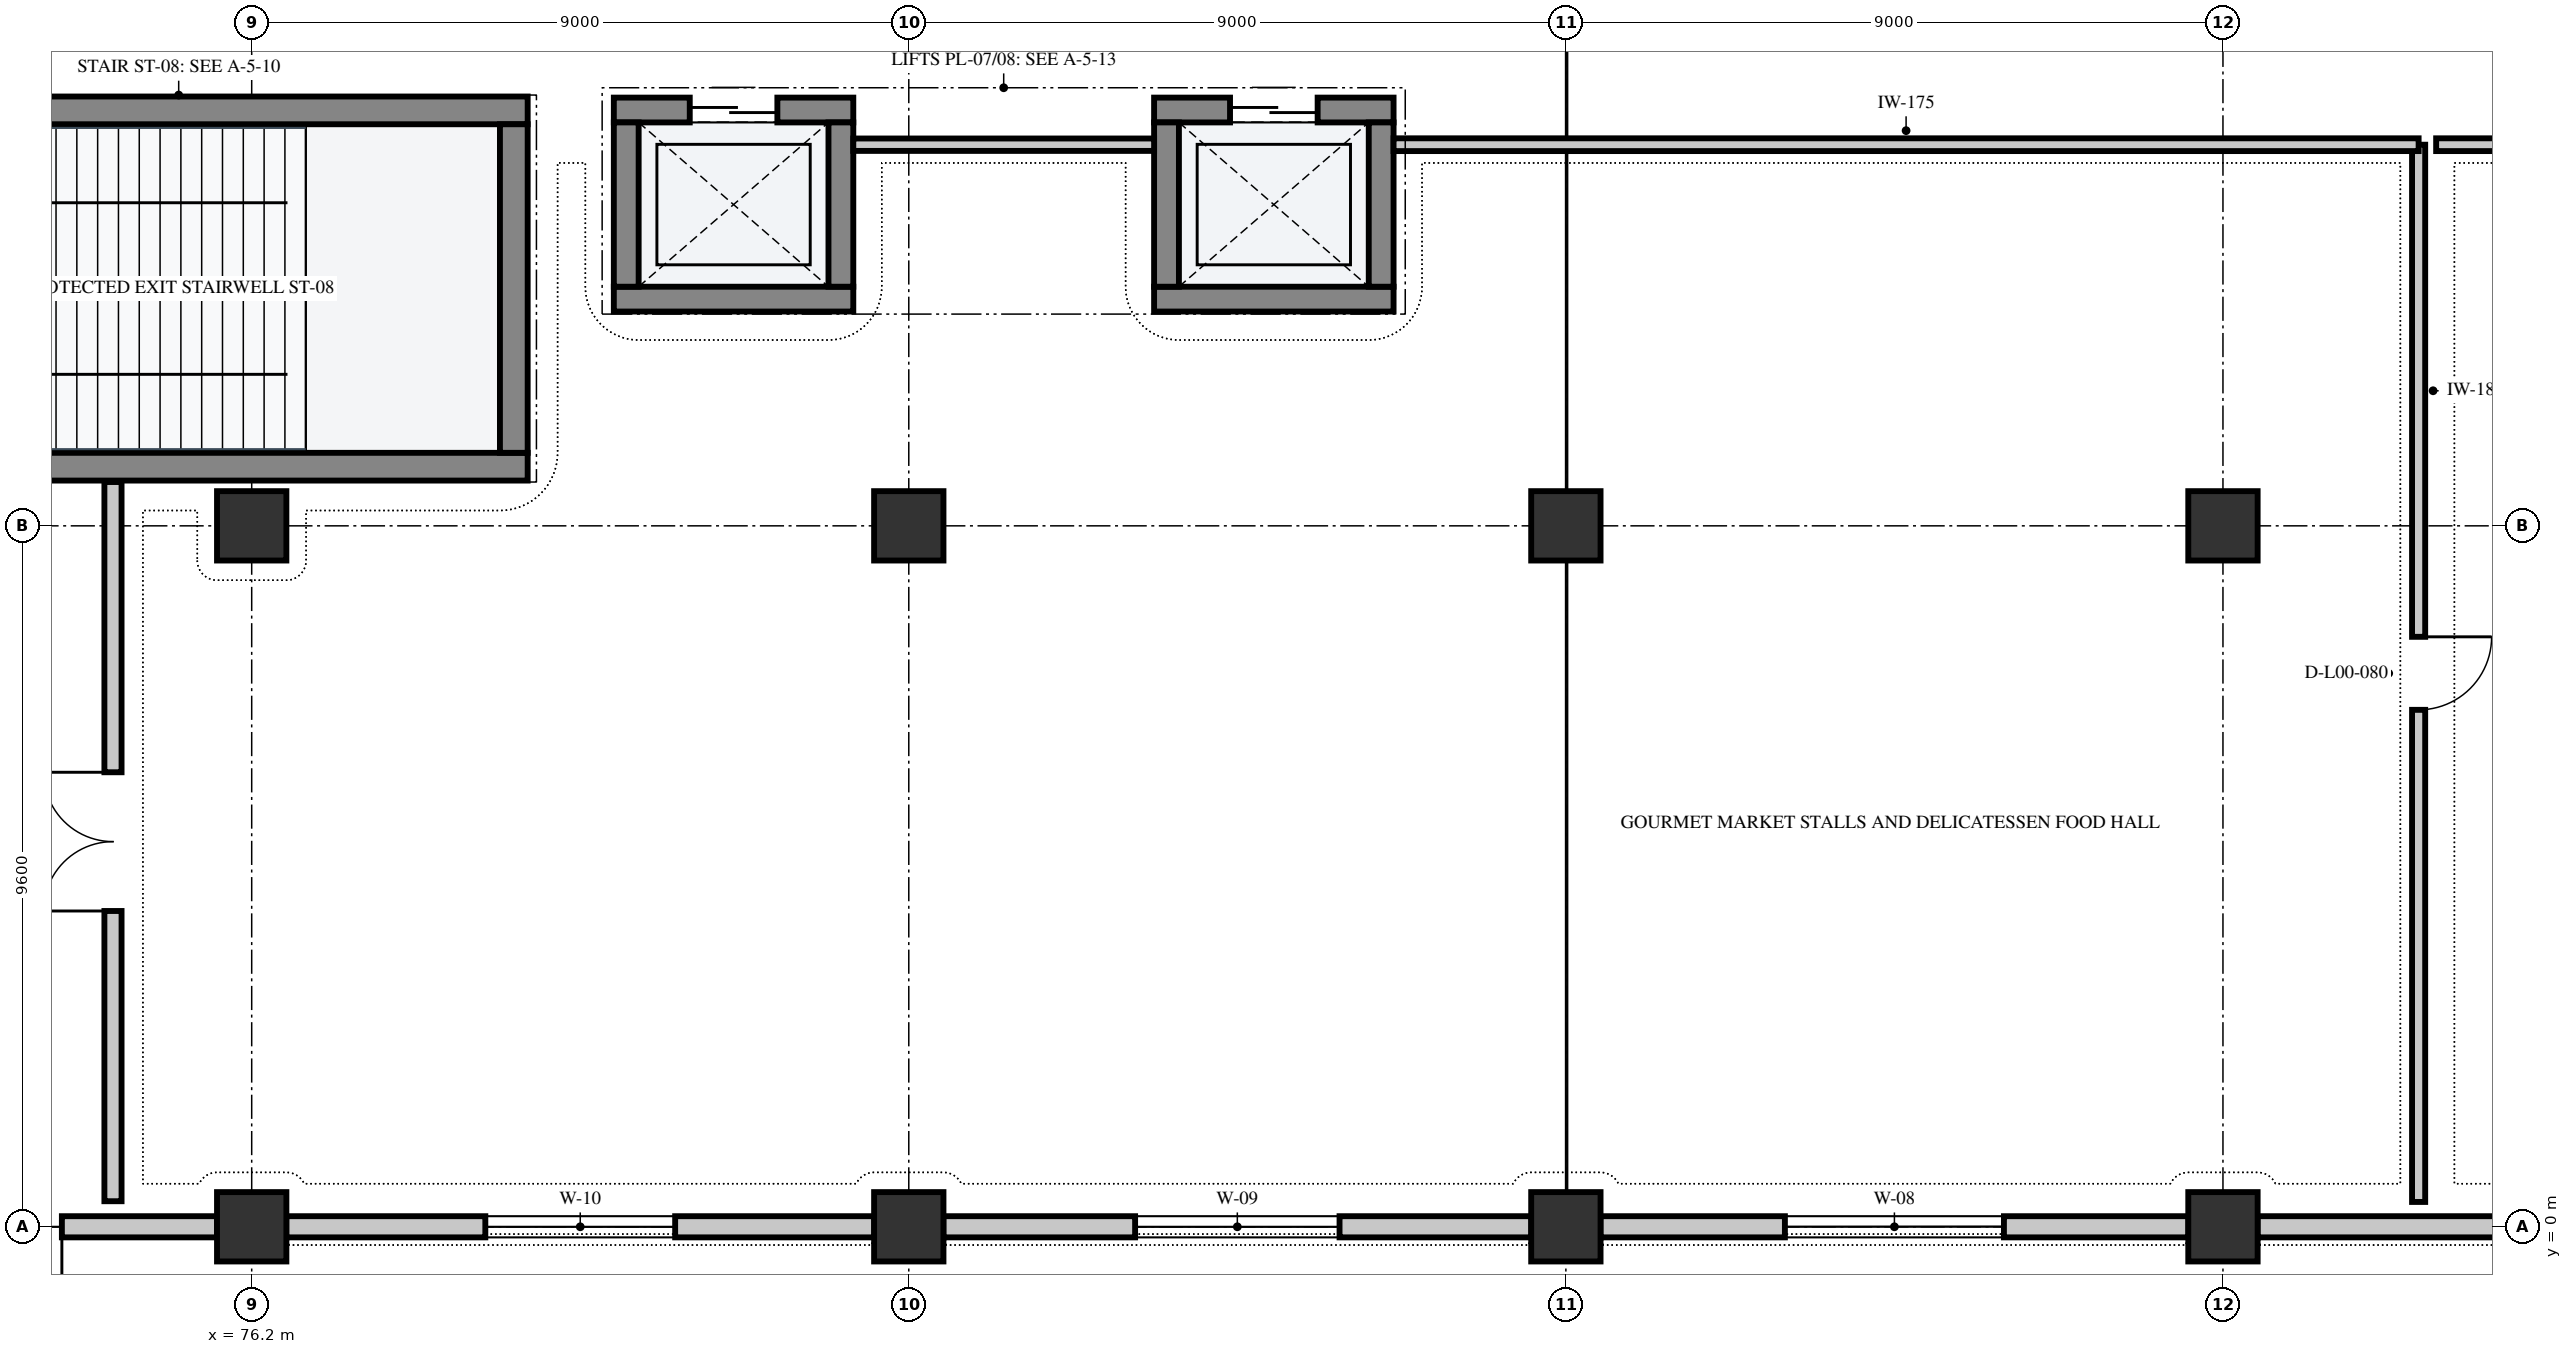
"""IFC4 building model, lengths in metres.
Left out: names, types, materials, properties, quantities, classifications, styles, units other than length and angle.
Written with IfcOpenShell. Run it as: python <this file> out.ifc"""

import sys

from ifc_helpers import new_model, si_unit, direction, frame, frame_2d, origin, origin_2d, place, context, subcontext, project, spatial, rectangle, extrude, element, fill, save


model = new_model("IFC4")
c1 = context("Model", 3, precision=1e-05, world=origin(), true_north=direction((0.0, 1.0)))
c2 = subcontext(c1, "Body", "Model", "MODEL_VIEW")
j1 = project(units=[si_unit("LENGTHUNIT", "METRE"), si_unit("PLANEANGLEUNIT", "RADIAN")], contexts=[c1])
p1 = place(None, origin())
s1 = spatial("IfcSite", under=j1, at=p1, CompositionType="ELEMENT")
p2 = place(p1, origin())
s2 = spatial("IfcBuilding", under=s1, at=p2, CompositionType="ELEMENT")
p3 = place(p2, origin())
s3 = spatial("IfcBuildingStorey", under=s2, at=p3, CompositionType="ELEMENT", Elevation=0.0)
p4 = place(p3, frame((85.2, 0.0, -0.3), z_axis=(0.0, 0.0, 1.0), x_axis=(1.0, 0.0, 0.0)))
e1 = element("IfcColumn", 1, at=p4, inside=s3, PredefinedType="COLUMN", context=c2, shape_type="SweptSolid", body=[
    extrude(rectangle(XDim=0.95, YDim=0.95, at=origin_2d()), origin(), (0.0, 0.0, 1.0), 5.7),
])
p5 = place(p3, frame((85.2, 9.6, 0.0), z_axis=(0.0, 0.0, 1.0), x_axis=(1.0, 0.0, 0.0)))
e2 = element("IfcColumn", 2, at=p5, inside=s3, PredefinedType="COLUMN", context=c2, shape_type="SweptSolid", body=[
    extrude(rectangle(XDim=0.95, YDim=0.95, at=origin_2d()), origin(), (0.0, 0.0, 1.0), 5.4),
])
p6 = place(p3, frame((94.2, 0.0, -0.3), z_axis=(0.0, 0.0, 1.0), x_axis=(1.0, 0.0, 0.0)))
e3 = element("IfcColumn", 3, at=p6, inside=s3, PredefinedType="COLUMN", context=c2, shape_type="SweptSolid", body=[
    extrude(rectangle(XDim=0.95, YDim=0.95, at=origin_2d()), origin(), (0.0, 0.0, 1.0), 5.7),
])
p7 = place(p3, frame((94.2, 9.6, 0.0), z_axis=(0.0, 0.0, 1.0), x_axis=(1.0, 0.0, 0.0)))
e4 = element("IfcColumn", 4, at=p7, inside=s3, PredefinedType="COLUMN", context=c2, shape_type="SweptSolid", body=[
    extrude(rectangle(XDim=0.95, YDim=0.95, at=origin_2d()), origin(), (0.0, 0.0, 1.0), 5.4),
])
p8 = place(p3, frame((103.2, 0.0, -0.3), z_axis=(0.0, 0.0, 1.0), x_axis=(1.0, 0.0, 0.0)))
e5 = element("IfcColumn", 5, at=p8, inside=s3, PredefinedType="COLUMN", context=c2, shape_type="SweptSolid", body=[
    extrude(rectangle(XDim=0.95, YDim=0.95, at=origin_2d()), origin(), (0.0, 0.0, 1.0), 5.7),
])
p9 = place(p3, frame((103.2, 9.6, 0.0), z_axis=(0.0, 0.0, 1.0), x_axis=(1.0, 0.0, 0.0)))
e6 = element("IfcColumn", 6, at=p9, inside=s3, PredefinedType="COLUMN", context=c2, shape_type="SweptSolid", body=[
    extrude(rectangle(XDim=0.95, YDim=0.95, at=origin_2d()), origin(), (0.0, 0.0, 1.0), 5.4),
])
p10 = place(p3, frame((76.2, 0.0, -0.3), z_axis=(0.0, 0.0, 1.0), x_axis=(1.0, 0.0, 0.0)))
e7 = element("IfcColumn", 7, at=p10, inside=s3, PredefinedType="COLUMN", context=c2, shape_type="SweptSolid", body=[
    extrude(rectangle(XDim=0.95, YDim=0.95, at=origin_2d()), origin(), (0.0, 0.0, 1.0), 5.7),
])
p11 = place(p3, frame((76.2, 9.6, 0.0), z_axis=(0.0, 0.0, 1.0), x_axis=(1.0, 0.0, 0.0)))
e8 = element("IfcColumn", 8, at=p11, inside=s3, PredefinedType="COLUMN", context=c2, shape_type="SweptSolid", body=[
    extrude(rectangle(XDim=0.95, YDim=0.95, at=origin_2d()), origin(), (0.0, 0.0, 1.0), 5.4),
])
p12 = place(p3, frame((111.727, 0.0, 0.0), z_axis=(0.0, 0.0, 1.0), x_axis=(-1.0, 0.0, 0.0)))
e9 = element("IfcWall", 9, at=p12, inside=s3, PredefinedType="SOLIDWALL", context=c2, shape_type="SweptSolid", body=[
    extrude(rectangle(XDim=8.054, YDim=0.29, at=frame_2d((4.027, 0.0))), origin(), (0.0, 0.0, 1.0), 5.09),
])
p13 = place(p12, frame((3.427, 0.0, 1.05)))
e10 = element("IfcOpeningElement", 10, at=p13, cuts=e9, PredefinedType="OPENING", context=c2, shape_type="SweptSolid", body=[
    extrude(rectangle(XDim=1.2, YDim=2.0, at=frame_2d((0.6, 1.0))), frame((0.0, 0.157, 0.0), z_axis=(0.0, -1.0, 0.0), x_axis=(1.0, 0.0, 0.0)), (0.0, 0.0, 1.0), 0.314),
])
p14 = place(p3, frame((102.727, 0.0, 0.0), z_axis=(0.0, 0.0, 1.0), x_axis=(-1.0, 0.0, 0.0)))
e11 = element("IfcWall", 11, at=p14, inside=s3, PredefinedType="SOLIDWALL", context=c2, shape_type="SweptSolid", body=[
    extrude(rectangle(XDim=8.054, YDim=0.29, at=frame_2d((4.027, 0.0))), origin(), (0.0, 0.0, 1.0), 5.09),
])
p15 = place(p14, frame((2.527, 0.0, 0.85)))
e12 = element("IfcOpeningElement", 12, at=p15, cuts=e11, PredefinedType="OPENING", context=c2, shape_type="SweptSolid", body=[
    extrude(rectangle(XDim=3.0, YDim=2.5, at=frame_2d((1.5, 1.25))), frame((0.0, 0.157, 0.0), z_axis=(0.0, -1.0, 0.0), x_axis=(1.0, 0.0, 0.0)), (0.0, 0.0, 1.0), 0.314),
])
p16 = place(p3, frame((93.727, 0.0, 0.0), z_axis=(0.0, 0.0, 1.0), x_axis=(-1.0, 0.0, 0.0)))
e13 = element("IfcWall", 13, at=p16, inside=s3, PredefinedType="SOLIDWALL", context=c2, shape_type="SweptSolid", body=[
    extrude(rectangle(XDim=8.054, YDim=0.29, at=frame_2d((4.027, 0.0))), origin(), (0.0, 0.0, 1.0), 5.09),
])
p17 = place(p16, frame((2.627, 0.0, 0.9)))
e14 = element("IfcOpeningElement", 14, at=p17, cuts=e13, PredefinedType="OPENING", context=c2, shape_type="SweptSolid", body=[
    extrude(rectangle(XDim=2.8, YDim=2.4, at=frame_2d((1.4, 1.2))), frame((0.0, 0.157, 0.0), z_axis=(0.0, -1.0, 0.0), x_axis=(1.0, 0.0, 0.0)), (0.0, 0.0, 1.0), 0.314),
])
p18 = place(p3, frame((84.727, 0.0, 0.0), z_axis=(0.0, 0.0, 1.0), x_axis=(-1.0, 0.0, 0.0)))
e15 = element("IfcWall", 15, at=p18, inside=s3, PredefinedType="SOLIDWALL", context=c2, shape_type="SweptSolid", body=[
    extrude(rectangle(XDim=8.054, YDim=0.29, at=frame_2d((4.027, 0.0))), origin(), (0.0, 0.0, 1.0), 5.09),
])
p19 = place(p18, frame((2.727, 0.0, 0.95)))
e16 = element("IfcOpeningElement", 16, at=p19, cuts=e15, PredefinedType="OPENING", context=c2, shape_type="SweptSolid", body=[
    extrude(rectangle(XDim=2.6, YDim=2.3, at=frame_2d((1.3, 1.15))), frame((0.0, 0.157, 0.0), z_axis=(0.0, -1.0, 0.0), x_axis=(1.0, 0.0, 0.0)), (0.0, 0.0, 1.0), 0.314),
])
p20 = place(p3, frame((75.725, 0.0, 0.0), z_axis=(0.0, 0.0, 1.0), x_axis=(-1.0, 0.0, 0.0)))
e17 = element("IfcWall", 17, at=p20, inside=s3, PredefinedType="SOLIDWALL", context=c2, shape_type="SweptSolid", body=[
    extrude(rectangle(XDim=8.05, YDim=0.29, at=frame_2d((4.025, 0.0))), origin(), (0.0, 0.0, 1.0), 5.09),
])
p21 = place(p20, frame((2.125, 0.0, 0.0)))
e18 = element("IfcOpeningElement", 18, at=p21, cuts=e17, PredefinedType="OPENING", context=c2, shape_type="SweptSolid", body=[
    extrude(rectangle(XDim=2.2, YDim=2.3, at=frame_2d((1.1, 1.15))), frame((0.0, 0.157, 0.0), z_axis=(0.0, -1.0, 0.0), x_axis=(1.0, 0.0, 0.0)), (0.0, 0.0, 1.0), 0.314),
])
p22 = place(p3, frame((70.42, 10.41, 0.0), z_axis=(0.0, 0.0, 1.0), x_axis=(1.0, 0.0, 0.0)))
e19 = element("IfcWall", 19, at=p22, inside=s3, PredefinedType="SHEAR", context=c2, shape_type="SweptSolid", body=[
    extrude(rectangle(XDim=9.56, YDim=0.38, at=frame_2d((4.78, 0.0))), origin(), (0.0, 0.0, 1.0), 5.09),
])
p23 = place(p22, frame((0.55, 0.0, 0.0)))
e20 = element("IfcOpeningElement", 20, at=p23, cuts=e19, PredefinedType="OPENING", context=c2, shape_type="SweptSolid", body=[
    extrude(rectangle(XDim=1.35, YDim=2.2, at=frame_2d((0.675, 1.1))), frame((0.0, 0.202, 0.0), z_axis=(0.0, -1.0, 0.0), x_axis=(1.0, 0.0, 0.0)), (0.0, 0.0, 1.0), 0.404),
])
p24 = place(p3, frame((70.42, 15.29, 0.0), z_axis=(0.0, 0.0, 1.0), x_axis=(1.0, 0.0, 0.0)))
e21 = element("IfcWall", 21, at=p24, inside=s3, PredefinedType="SHEAR", context=c2, shape_type="SweptSolid", body=[
    extrude(rectangle(XDim=9.56, YDim=0.38, at=frame_2d((4.78, 0.0))), origin(), (0.0, 0.0, 1.0), 5.09),
])
p25 = place(p24, frame((0.55, 0.0, 0.0)))
e22 = element("IfcOpeningElement", 22, at=p25, cuts=e21, PredefinedType="OPENING", context=c2, shape_type="SweptSolid", body=[
    extrude(rectangle(XDim=1.35, YDim=2.2, at=frame_2d((0.675, 1.1))), frame((0.0, 0.202, 0.0), z_axis=(0.0, -1.0, 0.0), x_axis=(1.0, 0.0, 0.0)), (0.0, 0.0, 1.0), 0.404),
])
p26 = place(p3, frame((79.79, 10.6, 0.0), z_axis=(0.0, 0.0, 1.0), x_axis=(0.0, 1.0, 0.0)))
e23 = element("IfcWall", 23, at=p26, inside=s3, PredefinedType="SHEAR", context=c2, shape_type="SweptSolid", body=[
    extrude(rectangle(XDim=4.5, YDim=0.38, at=frame_2d((2.25, 0.0))), origin(), (0.0, 0.0, 1.0), 5.09),
])
p27 = place(p3, frame((81.16, 12.705, 0.0), z_axis=(0.0, 0.0, 1.0), x_axis=(1.0, 0.0, 0.0)))
e24 = element("IfcWall", 24, at=p27, inside=s3, PredefinedType="SHEAR", context=c2, shape_type="SweptSolid", body=[
    extrude(rectangle(XDim=3.28, YDim=0.34, at=frame_2d((1.64, 0.0))), origin(), (0.0, 0.0, 1.0), 5.09),
])
p28 = place(p3, frame((81.16, 15.295, 0.0), z_axis=(0.0, 0.0, 1.0), x_axis=(1.0, 0.0, 0.0)))
e25 = element("IfcWall", 25, at=p28, inside=s3, PredefinedType="SHEAR", context=c2, shape_type="SweptSolid", body=[
    extrude(rectangle(XDim=3.28, YDim=0.34, at=frame_2d((1.64, 0.0))), origin(), (0.0, 0.0, 1.0), 5.09),
])
p29 = place(p28, frame((1.04, 0.0, 0.0)))
e26 = element("IfcOpeningElement", 26, at=p29, cuts=e25, PredefinedType="OPENING", context=c2, shape_type="SweptSolid", body=[
    extrude(rectangle(XDim=1.2, YDim=2.2, at=frame_2d((0.6, 1.1))), frame((0.0, 0.182, 0.0), z_axis=(0.0, -1.0, 0.0), x_axis=(1.0, 0.0, 0.0)), (0.0, 0.0, 1.0), 0.364),
])
for number, where, z_axis, x_axis in (
    (27, (81.33, 12.875, 0.0), (0.0, 0.0, 1.0), (0.0, 1.0, 0.0)),
    (28, (84.27, 12.875, 0.0), (0.0, 0.0, 1.0), (0.0, 1.0, 0.0)),
):
    element("IfcWall", number, at=place(p3, frame(where, z_axis=z_axis, x_axis=x_axis)), inside=s3, PredefinedType="SHEAR", context=c2, shape_type="SweptSolid", body=[
        extrude(rectangle(XDim=2.25, YDim=0.34, at=frame_2d((1.125, 0.0))), origin(), (0.0, 0.0, 1.0), 5.09),
    ])
p30 = place(p3, frame((88.56, 12.705, 0.0), z_axis=(0.0, 0.0, 1.0), x_axis=(1.0, 0.0, 0.0)))
e29 = element("IfcWall", 29, at=p30, inside=s3, PredefinedType="SHEAR", context=c2, shape_type="SweptSolid", body=[
    extrude(rectangle(XDim=3.28, YDim=0.34, at=frame_2d((1.64, 0.0))), origin(), (0.0, 0.0, 1.0), 5.09),
])
p31 = place(p3, frame((88.56, 15.295, 0.0), z_axis=(0.0, 0.0, 1.0), x_axis=(1.0, 0.0, 0.0)))
e30 = element("IfcWall", 30, at=p31, inside=s3, PredefinedType="SHEAR", context=c2, shape_type="SweptSolid", body=[
    extrude(rectangle(XDim=3.28, YDim=0.34, at=frame_2d((1.64, 0.0))), origin(), (0.0, 0.0, 1.0), 5.09),
])
p32 = place(p31, frame((1.04, 0.0, 0.0)))
e31 = element("IfcOpeningElement", 31, at=p32, cuts=e30, PredefinedType="OPENING", context=c2, shape_type="SweptSolid", body=[
    extrude(rectangle(XDim=1.2, YDim=2.2, at=frame_2d((0.6, 1.1))), frame((0.0, 0.182, 0.0), z_axis=(0.0, -1.0, 0.0), x_axis=(1.0, 0.0, 0.0)), (0.0, 0.0, 1.0), 0.364),
])
for number, where, z_axis, x_axis in (
    (32, (88.73, 12.875, 0.0), (0.0, 0.0, 1.0), (0.0, 1.0, 0.0)),
    (33, (91.67, 12.875, 0.0), (0.0, 0.0, 1.0), (0.0, 1.0, 0.0)),
):
    element("IfcWall", number, at=place(p3, frame(where, z_axis=z_axis, x_axis=x_axis)), inside=s3, PredefinedType="SHEAR", context=c2, shape_type="SweptSolid", body=[
        extrude(rectangle(XDim=2.25, YDim=0.34, at=frame_2d((1.125, 0.0))), origin(), (0.0, 0.0, 1.0), 5.09),
    ])
p33 = place(p3, frame((74.3, 0.35, 0.0), z_axis=(0.0, 0.0, 1.0), x_axis=(0.0, 1.0, 0.0)))
e34 = element("IfcWall", 34, at=p33, inside=s3, PredefinedType="PARTITIONING", context=c2, shape_type="SweptSolid", body=[
    extrude(rectangle(XDim=9.85, YDim=0.235, at=frame_2d((4.925, 0.0))), origin(), (0.0, 0.0, 1.0), 4.03),
])
p34 = place(p33, frame((3.975, 0.0, 0.0)))
e35 = element("IfcOpeningElement", 35, at=p34, cuts=e34, PredefinedType="OPENING", context=c2, shape_type="SweptSolid", body=[
    extrude(rectangle(XDim=1.9, YDim=2.25, at=frame_2d((0.95, 1.125))), frame((0.0, 0.129, 0.0), z_axis=(0.0, -1.0, 0.0), x_axis=(1.0, 0.0, 0.0)), (0.0, 0.0, 1.0), 0.259),
])
p35 = place(p3, frame((105.88, 14.82, 0.0), z_axis=(0.0, 0.0, 1.0), x_axis=(0.0, -1.0, 0.0)))
e36 = element("IfcWall", 36, at=p35, inside=s3, PredefinedType="PARTITIONING", context=c2, shape_type="SweptSolid", body=[
    extrude(rectangle(XDim=14.48, YDim=0.18, at=frame_2d((7.24, 0.0))), origin(), (0.0, 0.0, 1.0), 4.03),
])
p36 = place(p35, frame((6.74, 0.0, 0.0)))
e37 = element("IfcOpeningElement", 37, at=p36, cuts=e36, PredefinedType="OPENING", context=c2, shape_type="SweptSolid", body=[
    extrude(rectangle(XDim=1.0, YDim=2.2, at=frame_2d((0.5, 1.1))), frame((0.0, 0.102, 0.0), z_axis=(0.0, -1.0, 0.0), x_axis=(1.0, 0.0, 0.0)), (0.0, 0.0, 1.0), 0.204),
])
p37 = place(p3, frame((91.84, 14.82, 0.0), z_axis=(0.0, 0.0, 1.0), x_axis=(1.0, 0.0, 0.0)))
e38 = element("IfcWall", 38, at=p37, inside=s3, PredefinedType="PARTITIONING", context=c2, shape_type="SweptSolid", body=[
    extrude(rectangle(XDim=14.04, YDim=0.175, at=frame_2d((7.02, 0.0))), origin(), (0.0, 0.0, 1.0), 4.03),
])
p38 = place(p3, frame((84.44, 14.82, 0.0), z_axis=(0.0, 0.0, 1.0), x_axis=(1.0, 0.0, 0.0)))
e39 = element("IfcWall", 39, at=p38, inside=s3, PredefinedType="PARTITIONING", context=c2, shape_type="SweptSolid", body=[
    extrude(rectangle(XDim=4.12, YDim=0.17, at=frame_2d((2.06, 0.0))), origin(), (0.0, 0.0, 1.0), 4.03),
])
p39 = place(p3, frame((106.12, 14.82, 0.0), z_axis=(0.0, 0.0, 1.0), x_axis=(1.0, 0.0, 0.0)))
e40 = element("IfcWall", 40, at=p39, inside=s3, PredefinedType="PARTITIONING", context=c2, shape_type="SweptSolid", body=[
    extrude(rectangle(XDim=7.662, YDim=0.175, at=frame_2d((3.831, 0.0))), origin(), (0.0, 0.0, 1.0), 4.03),
])
p40 = place(p39, frame((2.985, 0.0, 0.0)))
e41 = element("IfcOpeningElement", 41, at=p40, cuts=e40, PredefinedType="OPENING", context=c2, shape_type="SweptSolid", body=[
    extrude(rectangle(XDim=1.15, YDim=2.2, at=frame_2d((0.575, 1.1))), frame((0.0, 0.1, 0.0), z_axis=(0.0, -1.0, 0.0), x_axis=(1.0, 0.0, 0.0)), (0.0, 0.0, 1.0), 0.199),
])
p41 = place(p15, origin())
e42 = element("IfcWindow", 42, at=p41, inside=s3, PartitioningType="SINGLE_PANEL", PredefinedType="WINDOW", context=c2, shape_type="SweptSolid", body=[
    extrude(rectangle(XDim=3.0, YDim=2.5, at=frame_2d((1.5, 1.25))), frame((0.0, 0.03, 0.0), z_axis=(0.0, -1.0, 0.0), x_axis=(1.0, 0.0, 0.0)), (0.0, 0.0, 1.0), 0.06),
])
fill(e12, e42)
p42 = place(p17, origin())
e43 = element("IfcWindow", 43, at=p42, inside=s3, PartitioningType="SINGLE_PANEL", PredefinedType="WINDOW", context=c2, shape_type="SweptSolid", body=[
    extrude(rectangle(XDim=2.8, YDim=2.4, at=frame_2d((1.4, 1.2))), frame((0.0, 0.03, 0.0), z_axis=(0.0, -1.0, 0.0), x_axis=(1.0, 0.0, 0.0)), (0.0, 0.0, 1.0), 0.06),
])
fill(e14, e43)
p43 = place(p19, origin())
e44 = element("IfcWindow", 44, at=p43, inside=s3, PartitioningType="SINGLE_PANEL", PredefinedType="WINDOW", context=c2, shape_type="SweptSolid", body=[
    extrude(rectangle(XDim=2.6, YDim=2.3, at=frame_2d((1.3, 1.15))), frame((0.0, 0.03, 0.0), z_axis=(0.0, -1.0, 0.0), x_axis=(1.0, 0.0, 0.0)), (0.0, 0.0, 1.0), 0.06),
])
fill(e16, e44)
p44 = place(p21, origin())
e45 = element("IfcDoor", 45, at=p44, inside=s3, OperationType="DOUBLE_DOOR_SINGLE_SWING", PredefinedType="DOOR", context=c2, shape_type="SweptSolid", body=[
    extrude(rectangle(XDim=2.2, YDim=2.3, at=frame_2d((1.1, 1.15))), frame((0.0, 0.025, 0.0), z_axis=(0.0, -1.0, 0.0), x_axis=(1.0, 0.0, 0.0)), (0.0, 0.0, 1.0), 0.05),
])
fill(e18, e45)
p45 = place(p29, origin())
e46 = element("IfcDoor", 46, at=p45, inside=s3, OperationType="DOUBLE_DOOR_SLIDING", PredefinedType="DOOR", context=c2, shape_type="SweptSolid", body=[
    extrude(rectangle(XDim=1.2, YDim=2.2, at=frame_2d((0.6, 1.1))), frame((0.0, 0.025, 0.0), z_axis=(0.0, -1.0, 0.0), x_axis=(1.0, 0.0, 0.0)), (0.0, 0.0, 1.0), 0.05),
])
fill(e26, e46)
p46 = place(p32, origin())
e47 = element("IfcDoor", 47, at=p46, inside=s3, OperationType="DOUBLE_DOOR_SLIDING", PredefinedType="DOOR", context=c2, shape_type="SweptSolid", body=[
    extrude(rectangle(XDim=1.2, YDim=2.2, at=frame_2d((0.6, 1.1))), frame((0.0, 0.025, 0.0), z_axis=(0.0, -1.0, 0.0), x_axis=(1.0, 0.0, 0.0)), (0.0, 0.0, 1.0), 0.05),
])
fill(e31, e47)
p47 = place(p34, origin())
e48 = element("IfcDoor", 48, at=p47, inside=s3, OperationType="DOUBLE_DOOR_SINGLE_SWING", PredefinedType="DOOR", context=c2, shape_type="SweptSolid", body=[
    extrude(rectangle(XDim=1.9, YDim=2.25, at=frame_2d((0.95, 1.125))), frame((0.0, 0.025, 0.0), z_axis=(0.0, -1.0, 0.0), x_axis=(1.0, 0.0, 0.0)), (0.0, 0.0, 1.0), 0.05),
])
fill(e35, e48)
p48 = place(p36, origin())
e49 = element("IfcDoor", 49, at=p48, inside=s3, OperationType="SINGLE_SWING_LEFT", PredefinedType="DOOR", context=c2, shape_type="SweptSolid", body=[
    extrude(rectangle(XDim=1.0, YDim=2.2, at=frame_2d((0.5, 1.1))), frame((0.0, 0.025, 0.0), z_axis=(0.0, -1.0, 0.0), x_axis=(1.0, 0.0, 0.0)), (0.0, 0.0, 1.0), 0.05),
])
fill(e37, e49)
save(model, sys.argv[1])
